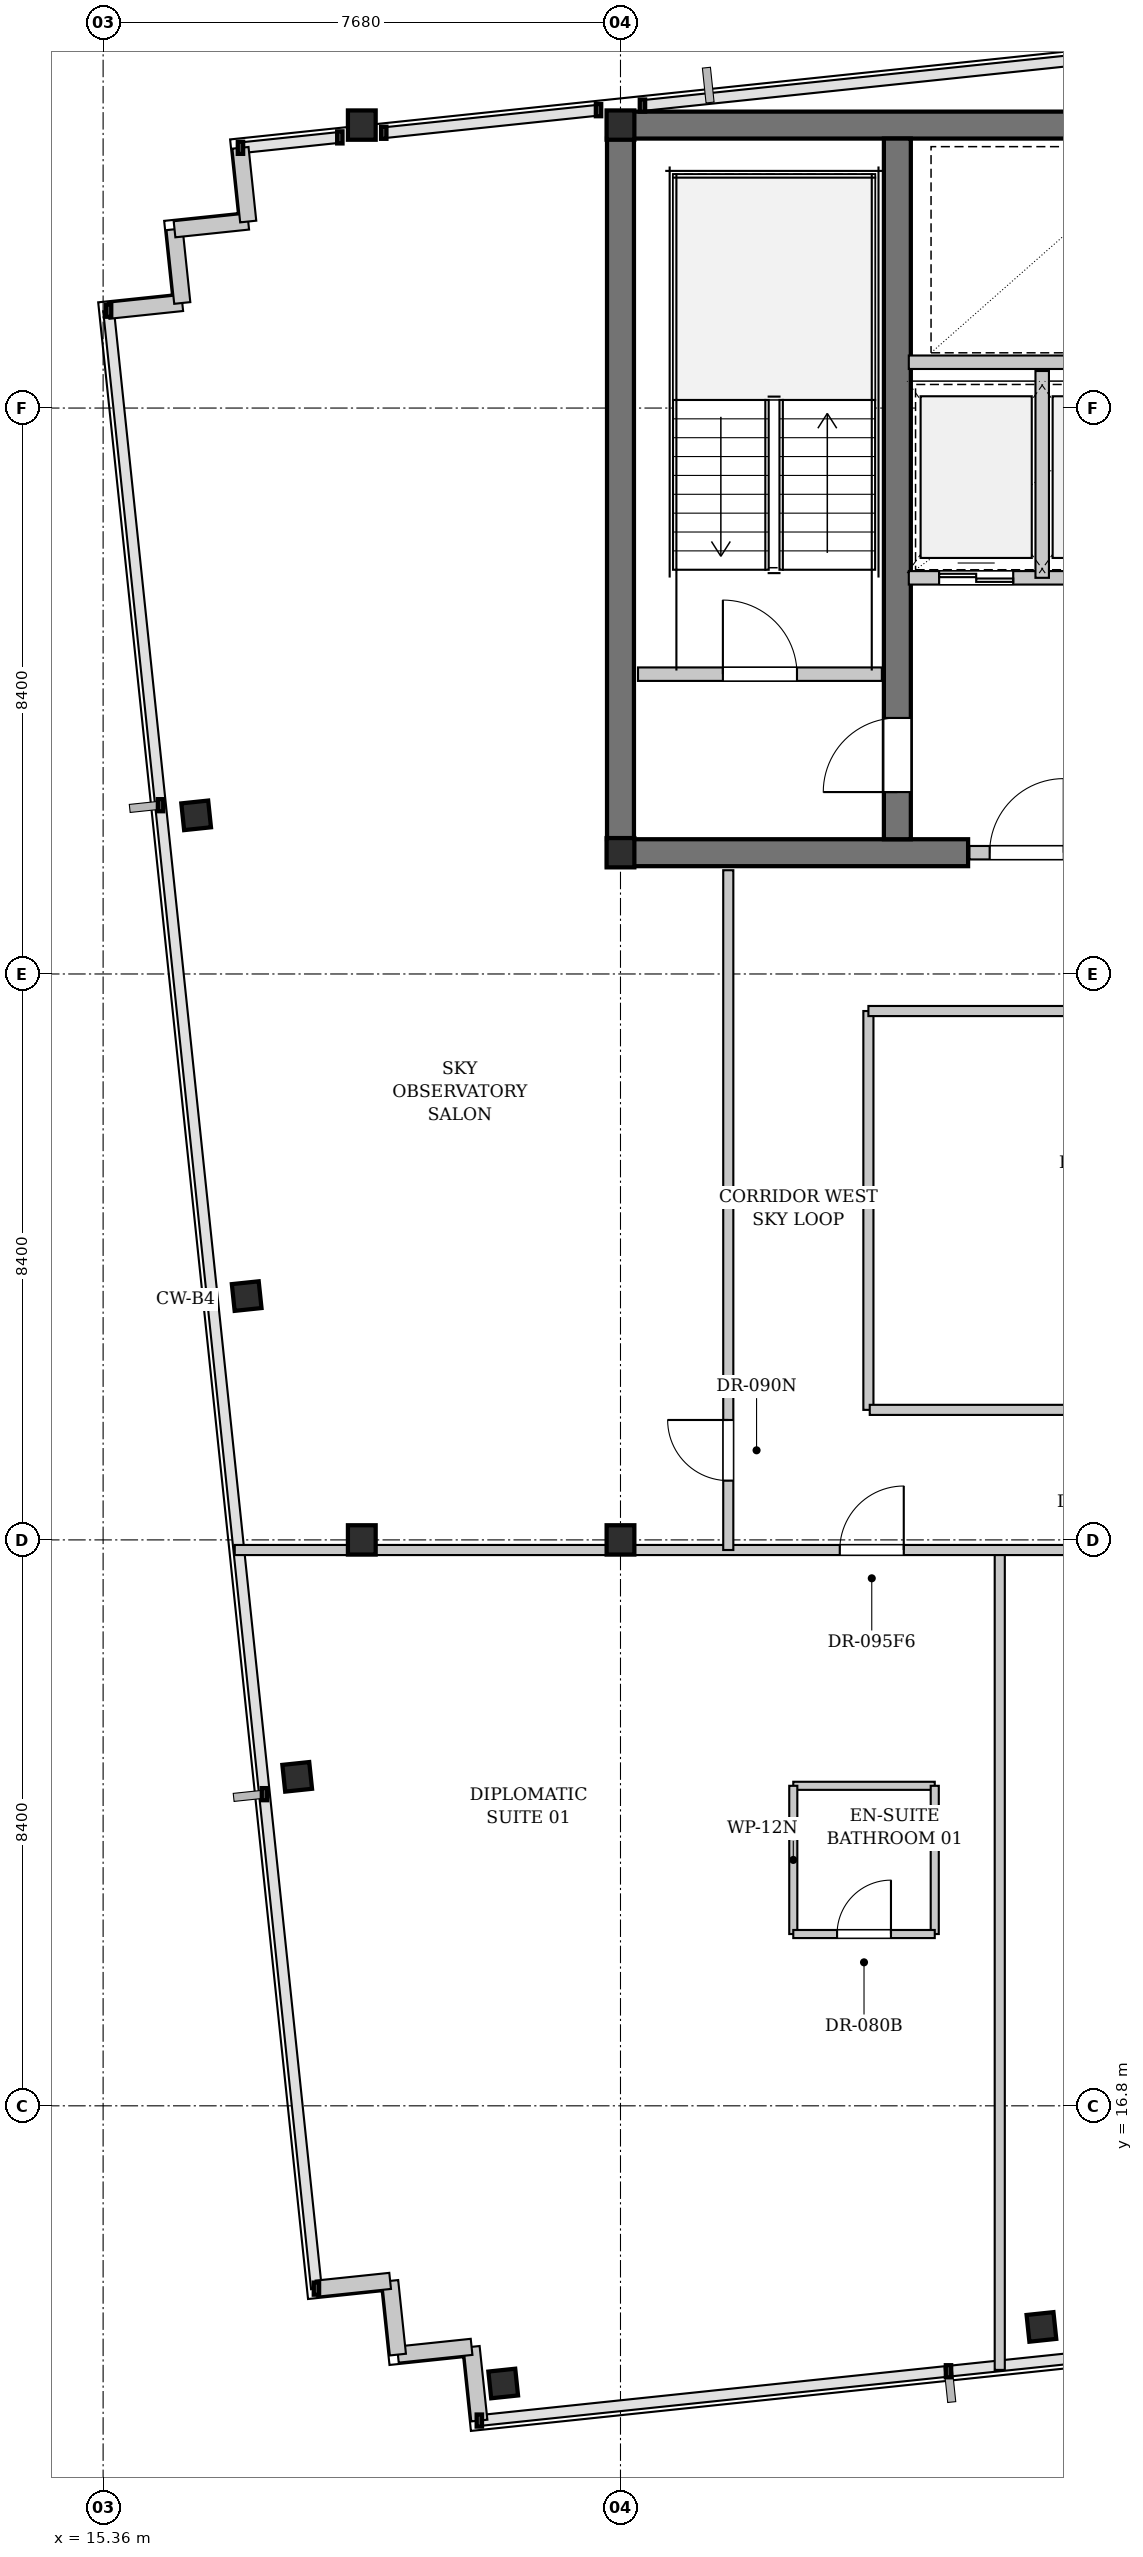
"""IFC4 building model, lengths in metres.
Left out: names, types, materials, properties, quantities, classifications, styles, units other than length and angle.
Written with IfcOpenShell. Run it as: python <this file> out.ifc"""

import sys

from ifc_helpers import new_model, si_unit, direction, frame, frame_2d, origin, origin_2d, place, context, subcontext, project, spatial, rectangle, i_section, extrude, element, fill, save


model = new_model("IFC4")
c1 = context("Model", 3, precision=1e-05, world=origin(), true_north=direction((0.0, 1.0)))
c2 = subcontext(c1, "Body", "Model", "MODEL_VIEW")
j1 = project(units=[si_unit("LENGTHUNIT", "METRE"), si_unit("PLANEANGLEUNIT", "RADIAN")], contexts=[c1])
p1 = place(None, origin())
s1 = spatial("IfcSite", under=j1, at=p1, CompositionType="ELEMENT")
p2 = place(p1, origin())
s2 = spatial("IfcBuilding", under=s1, at=p2, CompositionType="ELEMENT")
p3 = place(p2, frame((0.0, 0.0, 237.5)))
s3 = spatial("IfcBuildingStorey", under=s2, at=p3, CompositionType="ELEMENT", Elevation=237.5)
p4 = place(p3, frame((22.84, 46.2, 0.0), z_axis=(0.0, 0.0, 1.0), x_axis=(1.0, 0.0, 0.0)))
e1 = element("IfcWall", 1, at=p4, inside=s3, PredefinedType="SHEAR", context=c2, shape_type="SweptSolid", body=[
    extrude(rectangle(XDim=31.12, YDim=0.4, at=frame_2d((15.56, 0.0))), origin(), (0.0, 0.0, 1.0), 3.08),
])
p5 = place(p3, frame((22.84, 35.4, 0.0), z_axis=(0.0, 0.0, 1.0), x_axis=(1.0, 0.0, 0.0)))
e2 = element("IfcWall", 2, at=p5, inside=s3, PredefinedType="SHEAR", context=c2, shape_type="SweptSolid", body=[
    extrude(rectangle(XDim=5.36, YDim=0.4, at=frame_2d((2.68, 0.0))), origin(), (0.0, 0.0, 1.0), 3.08),
])
p6 = place(p3, frame((23.04, 35.6, 0.0), z_axis=(0.0, 0.0, 1.0), x_axis=(0.0, 1.0, 0.0)))
e3 = element("IfcWall", 3, at=p6, inside=s3, PredefinedType="SHEAR", context=c2, shape_type="SweptSolid", body=[
    extrude(rectangle(XDim=10.4, YDim=0.4, at=frame_2d((5.2, 0.0))), origin(), (0.0, 0.0, 1.0), 3.08),
])
p7 = place(p3, frame((27.15, 35.6, 0.0), z_axis=(0.0, 0.0, 1.0), x_axis=(0.0, 1.0, 0.0)))
e4 = element("IfcWall", 4, at=p7, inside=s3, PredefinedType="SHEAR", context=c2, shape_type="SweptSolid", body=[
    extrude(rectangle(XDim=10.4, YDim=0.4, at=frame_2d((5.2, 0.0))), origin(), (0.0, 0.0, 1.0), 3.08),
])
p8 = place(p7, frame((0.7, 0.0, 0.0)))
e5 = element("IfcOpeningElement", 5, at=p8, cuts=e4, PredefinedType="OPENING", context=c2, shape_type="SweptSolid", body=[
    extrude(rectangle(XDim=1.1, YDim=2.15, at=frame_2d((0.55, 1.075))), frame((0.0, 0.21, 0.0), z_axis=(0.0, -1.0, 0.0), x_axis=(1.0, 0.0, 0.0)), (0.0, 0.0, 1.0), 0.42),
])
for number, where, z_axis, x_axis in (
    (6, (23.04, 35.4, 0.0), (0.0, 0.0, 1.0), (1.0, 0.0, 0.0)),
    (7, (23.04, 46.2, 0.0), (0.0, 0.0, 1.0), (1.0, 0.0, 0.0)),
    (8, (23.04, 25.2, 0.0), (0.0, 0.0, 1.0), (1.0, 0.0, 0.0)),
    (9, (19.2, 25.2, 0.0), (0.0, 0.0, 1.0), (1.0, 0.0, 0.0)),
    (10, (19.2, 46.2, 0.0), (0.0, 0.0, 1.0), (1.0, 0.0, 0.0)),
):
    element("IfcColumn", number, at=place(p3, frame(where, z_axis=z_axis, x_axis=x_axis)), inside=s3, PredefinedType="COLUMN", context=c2, shape_type="SweptSolid", body=[
        extrude(i_section(OverallWidth=0.412, OverallDepth=0.435, WebThickness=0.036, FlangeThickness=0.058, FilletRadius=0.015, at=origin_2d()), origin(), (0.0, 0.0, 1.0), 3.3),
    ])
for number, where, z_axis, x_axis in (
    (11, (21.299, 12.678, 0.0), (0.0, 0.0, 1.0), (0.995, 0.105, 0.0)),
    (12, (29.288, 13.518, 0.0), (0.0, 0.0, 1.0), (0.995, 0.105, 0.0)),
    (13, (18.241, 21.683, 0.0), (0.0, 0.0, 1.0), (0.995, 0.105, 0.0)),
    (14, (17.491, 28.819, 0.0), (0.0, 0.0, 1.0), (0.995, 0.105, 0.0)),
    (15, (16.741, 35.955, 0.0), (0.0, 0.0, 1.0), (0.995, 0.105, 0.0)),
):
    element("IfcColumn", number, at=place(p3, frame(where, z_axis=z_axis, x_axis=x_axis)), inside=s3, PredefinedType="COLUMN", context=c2, shape_type="SweptSolid", body=[
        extrude(i_section(OverallWidth=0.401, OverallDepth=0.399, WebThickness=0.025, FlangeThickness=0.04, FilletRadius=0.015, at=origin_2d()), origin(), (0.0, 0.0, 1.0), 3.3),
    ])
for number, where, z_axis, x_axis in (
    (16, (20.945, 12.128, 0.0), (0.0, 0.0, 1.0), (-0.105, 0.995, 0.0)),
    (17, (20.83, 13.222, 0.0), (0.0, 0.0, 1.0), (-0.995, -0.105, 0.0)),
    (18, (19.736, 13.107, 0.0), (0.0, 0.0, 1.0), (-0.105, 0.995, 0.0)),
    (19, (19.621, 14.201, 0.0), (0.0, 0.0, 1.0), (-0.995, -0.105, 0.0)),
):
    element("IfcWall", number, at=place(p3, frame(where, z_axis=z_axis, x_axis=x_axis)), inside=s3, PredefinedType="SOLIDWALL", context=c2, shape_type="SweptSolid", body=[
        extrude(rectangle(XDim=1.1, YDim=0.24, at=frame_2d((0.55, 0.0))), origin(), (0.0, 0.0, 1.0), 3.08),
    ])
p9 = place(p3, frame((15.441, 43.445, 0.0), z_axis=(0.0, 0.0, 1.0), x_axis=(0.994495717747, 0.104777227405, 0.0)))
e20 = element("IfcWall", 20, at=p9, inside=s3, PredefinedType="SOLIDWALL", context=c2, shape_type="SweptSolid", body=[
    extrude(rectangle(XDim=1.1, YDim=0.24, at=frame_2d((0.55, 0.0))), origin(), (0.0, 0.0, 1.0), 3.08),
])
p10 = place(p3, frame((16.535, 43.56, 0.0), z_axis=(0.0, 0.0, 1.0), x_axis=(-0.104315068386, 0.994544300928, 0.0)))
e21 = element("IfcWall", 21, at=p10, inside=s3, PredefinedType="SOLIDWALL", context=c2, shape_type="SweptSolid", body=[
    extrude(rectangle(XDim=1.1, YDim=0.24, at=frame_2d((0.55, 0.0))), origin(), (0.0, 0.0, 1.0), 3.08),
])
p11 = place(p3, frame((16.42, 44.654, 0.0), z_axis=(0.0, 0.0, 1.0), x_axis=(0.994541884982, 0.104338099541, 0.0)))
e22 = element("IfcWall", 22, at=p11, inside=s3, PredefinedType="SOLIDWALL", context=c2, shape_type="SweptSolid", body=[
    extrude(rectangle(XDim=1.1, YDim=0.24, at=frame_2d((0.55, 0.0))), origin(), (0.0, 0.0, 1.0), 3.08),
])
p12 = place(p3, frame((17.514, 44.769, 0.0), z_axis=(0.0, 0.0, 1.0), x_axis=(-0.104534592565, 0.994521251134, 0.0)))
e23 = element("IfcWall", 23, at=p12, inside=s3, PredefinedType="SOLIDWALL", context=c2, shape_type="SweptSolid", body=[
    extrude(rectangle(XDim=1.1, YDim=0.24, at=frame_2d((0.55, 0.0))), origin(), (0.0, 0.0, 1.0), 3.08),
])
p13 = place(p3, frame((23.3, 38.05, 0.0), z_axis=(0.0, 0.0, 1.0), x_axis=(1.0, 0.0, 0.0)))
e24 = element("IfcWall", 24, at=p13, inside=s3, PredefinedType="PARTITIONING", context=c2, shape_type="SweptSolid", body=[
    extrude(rectangle(XDim=3.62, YDim=0.2, at=frame_2d((1.81, 0.0))), origin(), (0.0, 0.0, 1.0), 3.08),
])
p14 = place(p13, frame((1.26, 0.0, 0.0)))
e25 = element("IfcOpeningElement", 25, at=p14, cuts=e24, PredefinedType="OPENING", context=c2, shape_type="SweptSolid", body=[
    extrude(rectangle(XDim=1.1, YDim=2.15, at=frame_2d((0.55, 1.075))), frame((0.0, 0.11, 0.0), z_axis=(0.0, -1.0, 0.0), x_axis=(1.0, 0.0, 0.0)), (0.0, 0.0, 1.0), 0.22),
])
p15 = place(p3, frame((28.22, 35.4, 0.0), z_axis=(0.0, 0.0, 1.0), x_axis=(1.0, 0.0, 0.0)))
e26 = element("IfcWall", 26, at=p15, inside=s3, PredefinedType="PARTITIONING", context=c2, shape_type="SweptSolid", body=[
    extrude(rectangle(XDim=2.5, YDim=0.2, at=frame_2d((1.25, 0.0))), origin(), (0.0, 0.0, 1.0), 2.313),
])
p16 = place(p15, frame((0.3, 0.0, 0.0)))
e27 = element("IfcOpeningElement", 27, at=p16, cuts=e26, PredefinedType="OPENING", context=c2, shape_type="SweptSolid", body=[
    extrude(rectangle(XDim=1.1, YDim=2.15, at=frame_2d((0.55, 1.075))), frame((0.0, 0.11, 0.0), z_axis=(0.0, -1.0, 0.0), x_axis=(1.0, 0.0, 0.0)), (0.0, 0.0, 1.0), 0.22),
])
p17 = place(p3, frame((27.32, 39.48, 0.0), z_axis=(0.0, 0.0, 1.0), x_axis=(1.0, 0.0, 0.0)))
e28 = element("IfcWall", 28, at=p17, inside=s3, PredefinedType="PARTITIONING", context=c2, shape_type="SweptSolid", body=[
    extrude(rectangle(XDim=3.94, YDim=0.2, at=frame_2d((1.97, 0.0))), origin(), (0.0, 0.0, 1.0), 3.08),
])
p18 = place(p17, frame((0.45, 0.0, 0.0)))
e29 = element("IfcOpeningElement", 29, at=p18, cuts=e28, PredefinedType="OPENING", context=c2, shape_type="SweptSolid", body=[
    extrude(rectangle(XDim=1.1, YDim=2.2, at=frame_2d((0.55, 1.1))), frame((0.0, 0.11, 0.0), z_axis=(0.0, -1.0, 0.0), x_axis=(1.0, 0.0, 0.0)), (0.0, 0.0, 1.0), 0.22),
])
p19 = place(p17, frame((2.41, 0.0, 0.0)))
e30 = element("IfcOpeningElement", 30, at=p19, cuts=e28, PredefinedType="OPENING", context=c2, shape_type="SweptSolid", body=[
    extrude(rectangle(XDim=1.1, YDim=2.2, at=frame_2d((0.55, 1.1))), frame((0.0, 0.11, 0.0), z_axis=(0.0, -1.0, 0.0), x_axis=(1.0, 0.0, 0.0)), (0.0, 0.0, 1.0), 0.22),
])
p20 = place(p3, frame((29.3, 39.48, 0.0), z_axis=(0.0, 0.0, 1.0), x_axis=(0.0, 1.0, 0.0)))
e31 = element("IfcWall", 31, at=p20, inside=s3, PredefinedType="PARTITIONING", context=c2, shape_type="SweptSolid", body=[
    extrude(rectangle(XDim=3.07, YDim=0.2, at=frame_2d((1.535, 0.0))), origin(), (0.0, 0.0, 1.0), 3.08),
])
p21 = place(p3, frame((27.32, 42.68, 0.0), z_axis=(0.0, 0.0, 1.0), x_axis=(1.0, 0.0, 0.0)))
e32 = element("IfcWall", 32, at=p21, inside=s3, PredefinedType="PARTITIONING", context=c2, shape_type="SweptSolid", body=[
    extrude(rectangle(XDim=5.33, YDim=0.2, at=frame_2d((2.665, 0.0))), origin(), (0.0, 0.0, 1.0), 3.08),
])
p22 = place(p21, frame((4.18, 0.0, 0.0)))
e33 = element("IfcOpeningElement", 33, at=p22, cuts=e32, PredefinedType="OPENING", context=c2, shape_type="SweptSolid", body=[
    extrude(rectangle(XDim=0.9, YDim=2.15, at=frame_2d((0.45, 1.075))), frame((0.0, 0.11, 0.0), z_axis=(0.0, -1.0, 0.0), x_axis=(1.0, 0.0, 0.0)), (0.0, 0.0, 1.0), 0.22),
])
p23 = place(p3, frame((25.605, 21.55, 0.0), z_axis=(0.0, 0.0, 1.0), x_axis=(1.0, 0.0, 0.0)))
e34 = element("IfcWall", 34, at=p23, inside=s3, PredefinedType="PARTITIONING", context=c2, shape_type="SweptSolid", body=[
    extrude(rectangle(XDim=2.1, YDim=0.12, at=frame_2d((1.05, 0.0))), origin(), (0.0, 0.0, 1.0), 3.08),
])
for number, where, z_axis, x_axis in (
    (35, (25.605, 19.35, 0.0), (0.0, 0.0, 1.0), (0.0, 1.0, 0.0)),
    (36, (27.705, 19.35, 0.0), (0.0, 0.0, 1.0), (0.0, 1.0, 0.0)),
):
    element("IfcWall", number, at=place(p3, frame(where, z_axis=z_axis, x_axis=x_axis)), inside=s3, PredefinedType="PARTITIONING", context=c2, shape_type="SweptSolid", body=[
        extrude(rectangle(XDim=2.2, YDim=0.12, at=frame_2d((1.1, 0.0))), origin(), (0.0, 0.0, 1.0), 3.08),
    ])
p24 = place(p3, frame((25.605, 19.35, 0.0), z_axis=(0.0, 0.0, 1.0), x_axis=(1.0, 0.0, 0.0)))
e37 = element("IfcWall", 37, at=p24, inside=s3, PredefinedType="PARTITIONING", context=c2, shape_type="SweptSolid", body=[
    extrude(rectangle(XDim=2.1, YDim=0.12, at=frame_2d((1.05, 0.0))), origin(), (0.0, 0.0, 1.0), 3.08),
])
p25 = place(p24, frame((0.65, 0.0, 0.0)))
e38 = element("IfcOpeningElement", 38, at=p25, cuts=e37, PredefinedType="OPENING", context=c2, shape_type="SweptSolid", body=[
    extrude(rectangle(XDim=0.8, YDim=2.1, at=frame_2d((0.4, 1.05))), frame((0.0, 0.07, 0.0), z_axis=(0.0, -1.0, 0.0), x_axis=(1.0, 0.0, 0.0)), (0.0, 0.0, 1.0), 0.14),
])
p26 = place(p3, frame((28.67, 12.88, 0.0), z_axis=(0.0, 0.0, 1.0), x_axis=(0.0, 1.0, 0.0)))
e39 = element("IfcWall", 39, at=p26, inside=s3, PredefinedType="PARTITIONING", context=c2, shape_type="SweptSolid", body=[
    extrude(rectangle(XDim=12.19, YDim=0.15, at=frame_2d((6.095, 0.0))), origin(), (0.0, 0.0, 1.0), 3.08),
])
p27 = place(p3, frame((17.314, 25.05, 0.0), z_axis=(0.0, 0.0, 1.0), x_axis=(1.0, 0.0, 0.0)))
e40 = element("IfcWall", 40, at=p27, inside=s3, PredefinedType="PARTITIONING", context=c2, shape_type="SweptSolid", body=[
    extrude(rectangle(XDim=16.186, YDim=0.15, at=frame_2d((8.093, 0.0))), origin(), (0.0, 0.0, 1.0), 2.313),
])
p28 = place(p27, frame((8.981, 0.0, 0.0)))
e41 = element("IfcOpeningElement", 41, at=p28, cuts=e40, PredefinedType="OPENING", context=c2, shape_type="SweptSolid", body=[
    extrude(rectangle(XDim=0.95, YDim=2.15, at=frame_2d((0.475, 1.075))), frame((0.0, 0.085, 0.0), z_axis=(0.0, -1.0, 0.0), x_axis=(1.0, 0.0, 0.0)), (0.0, 0.0, 1.0), 0.17),
])
p29 = place(p27, frame((15.006, 0.0, 0.0)))
e42 = element("IfcOpeningElement", 42, at=p29, cuts=e40, PredefinedType="OPENING", context=c2, shape_type="SweptSolid", body=[
    extrude(rectangle(XDim=0.95, YDim=2.15, at=frame_2d((0.475, 1.075))), frame((0.0, 0.085, 0.0), z_axis=(0.0, -1.0, 0.0), x_axis=(1.0, 0.0, 0.0)), (0.0, 0.0, 1.0), 0.17),
])
p30 = place(p3, frame((24.64, 25.05, 0.0), z_axis=(0.0, 0.0, 1.0), x_axis=(0.0, 1.0, 0.0)))
e43 = element("IfcWall", 43, at=p30, inside=s3, PredefinedType="PARTITIONING", context=c2, shape_type="SweptSolid", body=[
    extrude(rectangle(XDim=10.09, YDim=0.15, at=frame_2d((5.045, 0.0))), origin(), (0.0, 0.0, 1.0), 3.08),
])
p31 = place(p30, frame((1.03, 0.0, 0.0)))
e44 = element("IfcOpeningElement", 44, at=p31, cuts=e43, PredefinedType="OPENING", context=c2, shape_type="SweptSolid", body=[
    extrude(rectangle(XDim=0.9, YDim=2.15, at=frame_2d((0.45, 1.075))), frame((0.0, 0.085, 0.0), z_axis=(0.0, -1.0, 0.0), x_axis=(1.0, 0.0, 0.0)), (0.0, 0.0, 1.0), 0.17),
])
p32 = place(p3, frame((26.72, 27.13, 0.0), z_axis=(0.0, 0.0, 1.0), x_axis=(0.0, 1.0, 0.0)))
e45 = element("IfcWall", 45, at=p32, inside=s3, PredefinedType="PARTITIONING", context=c2, shape_type="SweptSolid", body=[
    extrude(rectangle(XDim=5.92, YDim=0.15, at=frame_2d((2.96, 0.0))), origin(), (0.0, 0.0, 1.0), 3.08),
])
p33 = place(p3, frame((26.72, 33.05, 0.0), z_axis=(0.0, 0.0, 1.0), x_axis=(1.0, 0.0, 0.0)))
e46 = element("IfcWall", 46, at=p33, inside=s3, PredefinedType="PARTITIONING", context=c2, shape_type="SweptSolid", body=[
    extrude(rectangle(XDim=6.78, YDim=0.15, at=frame_2d((3.39, 0.0))), origin(), (0.0, 0.0, 1.0), 3.08),
])
p34 = place(p3, frame((26.74, 27.13, 0.0), z_axis=(0.0, 0.0, 1.0), x_axis=(1.0, 0.0, 0.0)))
e47 = element("IfcWall", 47, at=p34, inside=s3, PredefinedType="PARTITIONING", context=c2, shape_type="SweptSolid", body=[
    extrude(rectangle(XDim=6.75, YDim=0.15, at=frame_2d((3.375, 0.0))), origin(), (0.0, 0.0, 1.0), 3.08),
])
p35 = place(p34, frame((2.925, 0.0, 0.0)))
e48 = element("IfcOpeningElement", 48, at=p35, cuts=e47, PredefinedType="OPENING", context=c2, shape_type="SweptSolid", body=[
    extrude(rectangle(XDim=0.9, YDim=2.15, at=frame_2d((0.45, 1.075))), frame((0.0, 0.085, 0.0), z_axis=(0.0, -1.0, 0.0), x_axis=(1.0, 0.0, 0.0)), (0.0, 0.0, 1.0), 0.17),
])
p36 = place(p14, origin())
e49 = element("IfcDoor", 49, at=p36, inside=s3, OperationType="SINGLE_SWING_LEFT", PredefinedType="DOOR", context=c2, shape_type="SweptSolid", body=[
    extrude(rectangle(XDim=1.1, YDim=2.15, at=frame_2d((0.55, 1.075))), frame((0.0, 0.025, 0.0), z_axis=(0.0, -1.0, 0.0), x_axis=(1.0, 0.0, 0.0)), (0.0, 0.0, 1.0), 0.05),
])
fill(e25, e49)
p37 = place(p16, origin())
e50 = element("IfcDoor", 50, at=p37, inside=s3, OperationType="SINGLE_SWING_RIGHT", PredefinedType="DOOR", context=c2, shape_type="SweptSolid", body=[
    extrude(rectangle(XDim=1.1, YDim=2.15, at=frame_2d((0.55, 1.075))), frame((0.0, 0.025, 0.0), z_axis=(0.0, -1.0, 0.0), x_axis=(1.0, 0.0, 0.0)), (0.0, 0.0, 1.0), 0.05),
])
fill(e27, e50)
p38 = place(p18, origin())
e51 = element("IfcDoor", 51, at=p38, inside=s3, OperationType="DOUBLE_DOOR_SLIDING", PredefinedType="DOOR", context=c2, shape_type="SweptSolid", body=[
    extrude(rectangle(XDim=1.1, YDim=2.2, at=frame_2d((0.55, 1.1))), frame((0.0, 0.025, 0.0), z_axis=(0.0, -1.0, 0.0), x_axis=(1.0, 0.0, 0.0)), (0.0, 0.0, 1.0), 0.05),
])
fill(e29, e51)
p39 = place(p25, origin())
e52 = element("IfcDoor", 52, at=p39, inside=s3, OperationType="SINGLE_SWING_RIGHT", PredefinedType="DOOR", context=c2, shape_type="SweptSolid", body=[
    extrude(rectangle(XDim=0.8, YDim=2.1, at=frame_2d((0.4, 1.05))), frame((0.0, 0.025, 0.0), z_axis=(0.0, -1.0, 0.0), x_axis=(1.0, 0.0, 0.0)), (0.0, 0.0, 1.0), 0.05),
])
fill(e38, e52)
p40 = place(p28, origin())
e53 = element("IfcDoor", 53, at=p40, inside=s3, OperationType="SINGLE_SWING_RIGHT", PredefinedType="DOOR", context=c2, shape_type="SweptSolid", body=[
    extrude(rectangle(XDim=0.95, YDim=2.15, at=frame_2d((0.475, 1.075))), frame((0.0, 0.025, 0.0), z_axis=(0.0, -1.0, 0.0), x_axis=(1.0, 0.0, 0.0)), (0.0, 0.0, 1.0), 0.05),
])
fill(e41, e53)
p41 = place(p31, origin())
e54 = element("IfcDoor", 54, at=p41, inside=s3, OperationType="SINGLE_SWING_RIGHT", PredefinedType="DOOR", context=c2, shape_type="SweptSolid", body=[
    extrude(rectangle(XDim=0.9, YDim=2.15, at=frame_2d((0.45, 1.075))), frame((0.0, 0.025, 0.0), z_axis=(0.0, -1.0, 0.0), x_axis=(1.0, 0.0, 0.0)), (0.0, 0.0, 1.0), 0.05),
])
fill(e44, e54)
p42 = place(p8, origin())
e55 = element("IfcDoor", 55, at=p42, inside=s3, OperationType="SINGLE_SWING_LEFT", PredefinedType="DOOR", context=c2, shape_type="SweptSolid", body=[
    extrude(rectangle(XDim=1.1, YDim=2.15, at=frame_2d((0.55, 1.075))), frame((0.0, 0.025, 0.0), z_axis=(0.0, -1.0, 0.0), x_axis=(1.0, 0.0, 0.0)), (0.0, 0.0, 1.0), 0.05),
])
fill(e5, e55)
save(model, sys.argv[1])
